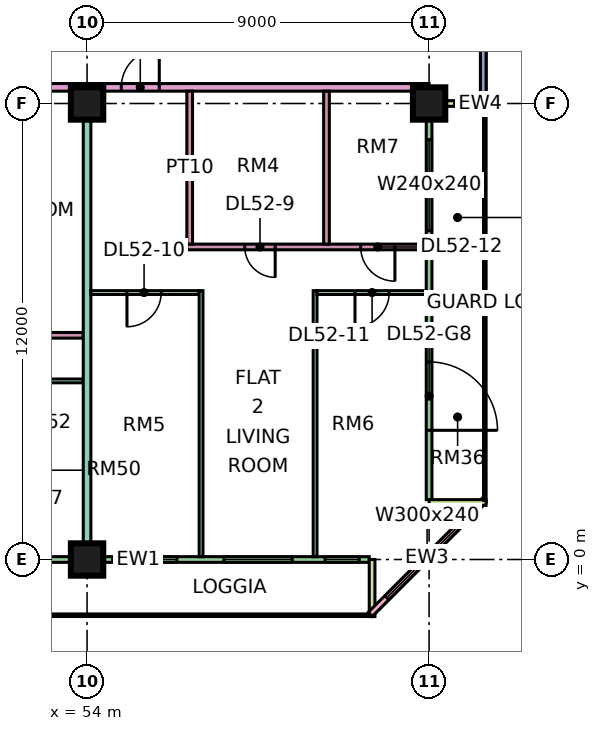
"""IFC4 building model, lengths in metres.
Left out: names, types, materials, properties, quantities, classifications, styles, units other than length and angle.
Written with IfcOpenShell. Run it as: python <this file> out.ifc"""

import sys

from ifc_helpers import new_model, si_unit, direction, frame, frame_2d, origin, origin_2d, place, context, subcontext, project, spatial, rectangle, extrude, element, fill, save


model = new_model("IFC4")
c1 = context("Model", 3, precision=1e-05, world=origin(), true_north=direction((0.0, 1.0)))
c2 = subcontext(c1, "Body", "Model", "MODEL_VIEW")
j1 = project(units=[si_unit("LENGTHUNIT", "METRE"), si_unit("PLANEANGLEUNIT", "RADIAN")], contexts=[c1])
p1 = place(None, origin())
s1 = spatial("IfcSite", under=j1, at=p1, CompositionType="ELEMENT")
p2 = place(p1, origin())
s2 = spatial("IfcBuilding", under=s1, at=p2, CompositionType="ELEMENT")
p3 = place(p2, frame((0.0, 0.0, 222.9)))
s3 = spatial("IfcBuildingStorey", under=s2, at=p3, CompositionType="ELEMENT", Elevation=222.9)
for number, where, z_axis, x_axis in (
    (1, (54.0, 0.0, 0.0), (0.0, 0.0, 1.0), (1.0, 0.0, 0.0)),
    (2, (54.0, 12.0, 0.0), (0.0, 0.0, 1.0), (1.0, 0.0, 0.0)),
    (3, (63.0, 12.0, 0.0), (0.0, 0.0, 1.0), (1.0, 0.0, 0.0)),
):
    element("IfcColumn", number, at=place(p3, frame(where, z_axis=z_axis, x_axis=x_axis)), inside=s3, PredefinedType="COLUMN", context=c2, shape_type="SweptSolid", body=[
        extrude(rectangle(XDim=0.85, YDim=0.85, at=origin_2d()), origin(), (0.0, 0.0, 1.0), 3.75),
    ])
p4 = place(p3, frame((48.075, 0.0, 0.0), z_axis=(0.0, 0.0, 1.0), x_axis=(1.0, 0.0, 0.0)))
e4 = element("IfcWall", 4, at=p4, inside=s3, PredefinedType="SOLIDWALL", context=c2, shape_type="SweptSolid", body=[
    extrude(rectangle(XDim=13.35, YDim=0.15, at=frame_2d((6.675, 0.0))), origin(), (0.0, 0.0, 1.0), 3.35),
])
p5 = place(p4, frame((0.562, 0.0, 0.45)))
e5 = element("IfcOpeningElement", 5, at=p5, cuts=e4, PredefinedType="OPENING", context=c2, shape_type="SweptSolid", body=[
    extrude(rectangle(XDim=1.8, YDim=2.4, at=frame_2d((0.9, 1.2))), frame((0.0, 0.085, 0.0), z_axis=(0.0, -1.0, 0.0), x_axis=(1.0, 0.0, 0.0)), (0.0, 0.0, 1.0), 0.17),
])
p6 = place(p4, frame((3.562, 0.0, 0.0)))
e6 = element("IfcOpeningElement", 6, at=p6, cuts=e4, PredefinedType="OPENING", context=c2, shape_type="SweptSolid", body=[
    extrude(rectangle(XDim=1.2, YDim=2.4, at=frame_2d((0.6, 1.2))), frame((0.0, 0.085, 0.0), z_axis=(0.0, -1.0, 0.0), x_axis=(1.0, 0.0, 0.0)), (0.0, 0.0, 1.0), 0.17),
])
p7 = place(p4, frame((7.087, 0.0, 0.45)))
e7 = element("IfcOpeningElement", 7, at=p7, cuts=e4, PredefinedType="OPENING", context=c2, shape_type="SweptSolid", body=[
    extrude(rectangle(XDim=1.2, YDim=2.4, at=frame_2d((0.6, 1.2))), frame((0.0, 0.085, 0.0), z_axis=(0.0, -1.0, 0.0), x_axis=(1.0, 0.0, 0.0)), (0.0, 0.0, 1.0), 0.17),
])
p8 = place(p4, frame((9.525, 0.0, 0.45)))
e8 = element("IfcOpeningElement", 8, at=p8, cuts=e4, PredefinedType="OPENING", context=c2, shape_type="SweptSolid", body=[
    extrude(rectangle(XDim=1.8, YDim=2.4, at=frame_2d((0.9, 1.2))), frame((0.0, 0.085, 0.0), z_axis=(0.0, -1.0, 0.0), x_axis=(1.0, 0.0, 0.0)), (0.0, 0.0, 1.0), 0.17),
])
p9 = place(p4, frame((12.188, 0.0, 0.45)))
e9 = element("IfcOpeningElement", 9, at=p9, cuts=e4, PredefinedType="OPENING", context=c2, shape_type="SweptSolid", body=[
    extrude(rectangle(XDim=0.9, YDim=2.4, at=frame_2d((0.45, 1.2))), frame((0.0, 0.085, 0.0), z_axis=(0.0, -1.0, 0.0), x_axis=(1.0, 0.0, 0.0)), (0.0, 0.0, 1.0), 0.17),
])
p10 = place(p3, frame((61.5, -1.5, 0.0), z_axis=(0.0, 0.0, 1.0), x_axis=(0.0, 1.0, 0.0)))
e10 = element("IfcWall", 10, at=p10, inside=s3, PredefinedType="SOLIDWALL", context=c2, shape_type="SweptSolid", body=[
    extrude(rectangle(XDim=1.5, YDim=0.15, at=frame_2d((0.75, 0.0))), origin(), (0.0, 0.0, 1.0), 3.35),
])
p11 = place(p3, frame((61.447, -1.447, 0.0), z_axis=(0.0, 0.0, 1.0), x_axis=(0.707106781187, 0.707106781187, 0.0)))
e11 = element("IfcWall", 11, at=p11, inside=s3, PredefinedType="SOLIDWALL", context=c2, shape_type="SweptSolid", body=[
    extrude(rectangle(XDim=4.243, YDim=0.15, at=frame_2d((2.121, 0.0))), origin(), (0.0, 0.0, 1.0), 3.35),
])
p12 = place(p11, frame((0.621, 0.0, 0.45)))
e12 = element("IfcOpeningElement", 12, at=p12, cuts=e11, PredefinedType="OPENING", context=c2, shape_type="SweptSolid", body=[
    extrude(rectangle(XDim=3.0, YDim=2.4, at=frame_2d((1.5, 1.2))), frame((0.0, 0.085, 0.0), z_axis=(0.0, -1.0, 0.0), x_axis=(1.0, 0.0, 0.0)), (0.0, 0.0, 1.0), 0.17),
])
p13 = place(p3, frame((63.0, 1.575, 0.0), z_axis=(0.0, 0.0, 1.0), x_axis=(0.0, 1.0, 0.0)))
e13 = element("IfcWall", 13, at=p13, inside=s3, PredefinedType="SOLIDWALL", context=c2, shape_type="SweptSolid", body=[
    extrude(rectangle(XDim=10.35, YDim=0.15, at=frame_2d((5.175, 0.0))), origin(), (0.0, 0.0, 1.0), 3.35),
])
p14 = place(p13, frame((1.825, 0.0, 0.0)))
e14 = element("IfcOpeningElement", 14, at=p14, cuts=e13, PredefinedType="OPENING", context=c2, shape_type="SweptSolid", body=[
    extrude(rectangle(XDim=1.8, YDim=2.4, at=frame_2d((0.9, 1.2))), frame((0.0, 0.085, 0.0), z_axis=(0.0, -1.0, 0.0), x_axis=(1.0, 0.0, 0.0)), (0.0, 0.0, 1.0), 0.17),
])
p15 = place(p13, frame((7.075, 0.0, 0.45)))
e15 = element("IfcOpeningElement", 15, at=p15, cuts=e13, PredefinedType="OPENING", context=c2, shape_type="SweptSolid", body=[
    extrude(rectangle(XDim=2.4, YDim=2.4, at=frame_2d((1.2, 1.2))), frame((0.0, 0.085, 0.0), z_axis=(0.0, -1.0, 0.0), x_axis=(1.0, 0.0, 0.0)), (0.0, 0.0, 1.0), 0.17),
])
for number, where, z_axis, x_axis in (
    (16, (64.5, 1.5, 0.0), (0.0, 0.0, 1.0), (-1.0, 0.0, 0.0)),
    (17, (64.5, 12.0, 0.0), (0.0, 0.0, 1.0), (-1.0, 0.0, 0.0)),
):
    element("IfcWall", number, at=place(p3, frame(where, z_axis=z_axis, x_axis=x_axis)), inside=s3, PredefinedType="SOLIDWALL", context=c2, shape_type="SweptSolid", body=[
        extrude(rectangle(XDim=1.5, YDim=0.15, at=frame_2d((0.75, 0.0))), origin(), (0.0, 0.0, 1.0), 3.35),
    ])
p16 = place(p3, frame((64.425, 12.075, 0.0), z_axis=(0.0, 0.0, 1.0), x_axis=(0.0, 1.0, 0.0)))
e18 = element("IfcWall", 18, at=p16, inside=s3, PredefinedType="SOLIDWALL", context=c2, shape_type="SweptSolid", body=[
    extrude(rectangle(XDim=10.425, YDim=0.15, at=frame_2d((5.212, 0.0))), origin(), (0.0, 0.0, 1.0), 3.35),
])
p17 = place(p16, frame((4.275, 0.0, 0.45)))
e19 = element("IfcOpeningElement", 19, at=p17, cuts=e18, PredefinedType="OPENING", context=c2, shape_type="SweptSolid", body=[
    extrude(rectangle(XDim=3.0, YDim=2.4, at=frame_2d((1.5, 1.2))), frame((0.0, 0.085, 0.0), z_axis=(0.0, -1.0, 0.0), x_axis=(1.0, 0.0, 0.0)), (0.0, 0.0, 1.0), 0.17),
])
p18 = place(p16, frame((8.625, 0.0, 0.45)))
e20 = element("IfcOpeningElement", 20, at=p18, cuts=e18, PredefinedType="OPENING", context=c2, shape_type="SweptSolid", body=[
    extrude(rectangle(XDim=1.2, YDim=2.4, at=frame_2d((0.6, 1.2))), frame((0.0, 0.085, 0.0), z_axis=(0.0, -1.0, 0.0), x_axis=(1.0, 0.0, 0.0)), (0.0, 0.0, 1.0), 0.17),
])
p19 = place(p3, frame((33.05, 4.7, 0.0), z_axis=(0.0, 0.0, 1.0), x_axis=(1.0, 0.0, 0.0)))
e21 = element("IfcWall", 21, at=p19, inside=s3, PredefinedType="PARTITIONING", context=c2, shape_type="SweptSolid", body=[
    extrude(rectangle(XDim=20.85, YDim=0.1, at=frame_2d((10.425, 0.0))), origin(), (0.0, 0.0, 1.0), 3.35),
])
p20 = place(p19, frame((10.0, 0.0, 0.0)))
e22 = element("IfcOpeningElement", 22, at=p20, cuts=e21, PredefinedType="OPENING", context=c2, shape_type="SweptSolid", body=[
    extrude(rectangle(XDim=0.9, YDim=2.1, at=frame_2d((0.45, 1.05))), frame((0.0, 0.06, 0.0), z_axis=(0.0, -1.0, 0.0), x_axis=(1.0, 0.0, 0.0)), (0.0, 0.0, 1.0), 0.12),
])
p21 = place(p19, frame((13.0, 0.0, 0.0)))
e23 = element("IfcOpeningElement", 23, at=p21, cuts=e21, PredefinedType="OPENING", context=c2, shape_type="SweptSolid", body=[
    extrude(rectangle(XDim=0.9, YDim=2.1, at=frame_2d((0.45, 1.05))), frame((0.0, 0.06, 0.0), z_axis=(0.0, -1.0, 0.0), x_axis=(1.0, 0.0, 0.0)), (0.0, 0.0, 1.0), 0.12),
])
p22 = place(p19, frame((16.0, 0.0, 0.0)))
e24 = element("IfcOpeningElement", 24, at=p22, cuts=e21, PredefinedType="OPENING", context=c2, shape_type="SweptSolid", body=[
    extrude(rectangle(XDim=0.9, YDim=2.1, at=frame_2d((0.45, 1.05))), frame((0.0, 0.06, 0.0), z_axis=(0.0, -1.0, 0.0), x_axis=(1.0, 0.0, 0.0)), (0.0, 0.0, 1.0), 0.12),
])
p23 = place(p19, frame((19.0, 0.0, 0.0)))
e25 = element("IfcOpeningElement", 25, at=p23, cuts=e21, PredefinedType="OPENING", context=c2, shape_type="SweptSolid", body=[
    extrude(rectangle(XDim=0.9, YDim=2.1, at=frame_2d((0.45, 1.05))), frame((0.0, 0.06, 0.0), z_axis=(0.0, -1.0, 0.0), x_axis=(1.0, 0.0, 0.0)), (0.0, 0.0, 1.0), 0.12),
])
p24 = place(p19, frame((4.0, 0.0, 0.0)))
e26 = element("IfcOpeningElement", 26, at=p24, cuts=e21, PredefinedType="OPENING", context=c2, shape_type="SweptSolid", body=[
    extrude(rectangle(XDim=0.9, YDim=2.1, at=frame_2d((0.45, 1.05))), frame((0.0, 0.06, 0.0), z_axis=(0.0, -1.0, 0.0), x_axis=(1.0, 0.0, 0.0)), (0.0, 0.0, 1.0), 0.12),
])
p25 = place(p3, frame((40.65, 12.425, 0.0), z_axis=(0.0, 0.0, 1.0), x_axis=(1.0, 0.0, 0.0)))
e27 = element("IfcWall", 27, at=p25, inside=s3, PredefinedType="PARTITIONING", context=c2, shape_type="SweptSolid", body=[
    extrude(rectangle(XDim=22.35, YDim=0.2, at=frame_2d((11.175, 0.0))), origin(), (0.0, 0.0, 1.0), 3.35),
])
p26 = place(p25, frame((14.25, 0.0, 0.0)))
e28 = element("IfcOpeningElement", 28, at=p26, cuts=e27, PredefinedType="OPENING", context=c2, shape_type="SweptSolid", body=[
    extrude(rectangle(XDim=1.0, YDim=2.1, at=frame_2d((0.5, 1.05))), frame((0.0, 0.11, 0.0), z_axis=(0.0, -1.0, 0.0), x_axis=(1.0, 0.0, 0.0)), (0.0, 0.0, 1.0), 0.22),
])
p27 = place(p25, frame((1.05, 0.0, 0.0)))
e29 = element("IfcOpeningElement", 29, at=p27, cuts=e27, PredefinedType="OPENING", context=c2, shape_type="SweptSolid", body=[
    extrude(rectangle(XDim=1.0, YDim=2.1, at=frame_2d((0.5, 1.05))), frame((0.0, 0.11, 0.0), z_axis=(0.0, -1.0, 0.0), x_axis=(1.0, 0.0, 0.0)), (0.0, 0.0, 1.0), 0.22),
])
p28 = place(p3, frame((43.575, 5.9, 0.0), z_axis=(0.0, 0.0, 1.0), x_axis=(1.0, 0.0, 0.0)))
e30 = element("IfcWall", 30, at=p28, inside=s3, PredefinedType="PARTITIONING", context=c2, shape_type="SweptSolid", body=[
    extrude(rectangle(XDim=10.325, YDim=0.15, at=frame_2d((5.163, 0.0))), origin(), (0.0, 0.0, 1.0), 3.35),
])
p29 = place(p28, frame((1.825, 0.0, 0.0)))
e31 = element("IfcOpeningElement", 31, at=p29, cuts=e30, PredefinedType="OPENING", context=c2, shape_type="SweptSolid", body=[
    extrude(rectangle(XDim=0.8, YDim=2.1, at=frame_2d((0.4, 1.05))), frame((0.0, 0.085, 0.0), z_axis=(0.0, -1.0, 0.0), x_axis=(1.0, 0.0, 0.0)), (0.0, 0.0, 1.0), 0.17),
])
p30 = place(p28, frame((6.975, 0.0, 0.0)))
e32 = element("IfcOpeningElement", 32, at=p30, cuts=e30, PredefinedType="OPENING", context=c2, shape_type="SweptSolid", body=[
    extrude(rectangle(XDim=0.9, YDim=2.1, at=frame_2d((0.45, 1.05))), frame((0.0, 0.085, 0.0), z_axis=(0.0, -1.0, 0.0), x_axis=(1.0, 0.0, 0.0)), (0.0, 0.0, 1.0), 0.17),
])
p31 = place(p3, frame((54.0, 0.074, 0.0), z_axis=(0.0, 0.0, 1.0), x_axis=(0.0, 1.0, 0.0)))
e33 = element("IfcWall", 33, at=p31, inside=s3, PredefinedType="PARTITIONING", context=c2, shape_type="SweptSolid", body=[
    extrude(rectangle(XDim=12.251, YDim=0.2, at=frame_2d((6.125, 0.0))), origin(), (0.0, 0.0, 1.0), 3.35),
])
p32 = place(p3, frame((54.1, 7.025, 0.0), z_axis=(0.0, 0.0, 1.0), x_axis=(1.0, 0.0, 0.0)))
e34 = element("IfcWall", 34, at=p32, inside=s3, PredefinedType="PARTITIONING", context=c2, shape_type="SweptSolid", body=[
    extrude(rectangle(XDim=2.85, YDim=0.1, at=frame_2d((1.425, 0.0))), origin(), (0.0, 0.0, 1.0), 3.35),
])
p33 = place(p32, frame((0.95, 0.0, 0.0)))
e35 = element("IfcOpeningElement", 35, at=p33, cuts=e34, PredefinedType="OPENING", context=c2, shape_type="SweptSolid", body=[
    extrude(rectangle(XDim=0.9, YDim=2.1, at=frame_2d((0.45, 1.05))), frame((0.0, 0.06, 0.0), z_axis=(0.0, -1.0, 0.0), x_axis=(1.0, 0.0, 0.0)), (0.0, 0.0, 1.0), 0.12),
])
p34 = place(p3, frame((56.625, 8.225, 0.0), z_axis=(0.0, 0.0, 1.0), x_axis=(1.0, 0.0, 0.0)))
e36 = element("IfcWall", 36, at=p34, inside=s3, PredefinedType="PARTITIONING", context=c2, shape_type="SweptSolid", body=[
    extrude(rectangle(XDim=6.301, YDim=0.15, at=frame_2d((3.15, 0.0))), origin(), (0.0, 0.0, 1.0), 3.35),
])
p35 = place(p34, frame((1.525, 0.0, 0.0)))
e37 = element("IfcOpeningElement", 37, at=p35, cuts=e36, PredefinedType="OPENING", context=c2, shape_type="SweptSolid", body=[
    extrude(rectangle(XDim=0.8, YDim=2.1, at=frame_2d((0.4, 1.05))), frame((0.0, 0.085, 0.0), z_axis=(0.0, -1.0, 0.0), x_axis=(1.0, 0.0, 0.0)), (0.0, 0.0, 1.0), 0.17),
])
p36 = place(p34, frame((4.575, 0.0, 0.0)))
e38 = element("IfcOpeningElement", 38, at=p36, cuts=e36, PredefinedType="OPENING", context=c2, shape_type="SweptSolid", body=[
    extrude(rectangle(XDim=0.9, YDim=2.1, at=frame_2d((0.45, 1.05))), frame((0.0, 0.085, 0.0), z_axis=(0.0, -1.0, 0.0), x_axis=(1.0, 0.0, 0.0)), (0.0, 0.0, 1.0), 0.17),
])
p37 = place(p3, frame((56.7, 8.3, 0.0), z_axis=(0.0, 0.0, 1.0), x_axis=(0.0, 1.0, 0.0)))
e39 = element("IfcWall", 39, at=p37, inside=s3, PredefinedType="PARTITIONING", context=c2, shape_type="SweptSolid", body=[
    extrude(rectangle(XDim=4.025, YDim=0.15, at=frame_2d((2.012, 0.0))), origin(), (0.0, 0.0, 1.0), 3.35),
])
for number, where, z_axis, x_axis in (
    (40, (57.0, 0.074, 0.0), (0.0, 0.0, 1.0), (0.0, 1.0, 0.0)),
    (41, (60.0, 0.074, 0.0), (0.0, 0.0, 1.0), (0.0, 1.0, 0.0)),
):
    element("IfcWall", number, at=place(p3, frame(where, z_axis=z_axis, x_axis=x_axis)), inside=s3, PredefinedType="PARTITIONING", context=c2, shape_type="SweptSolid", body=[
        extrude(rectangle(XDim=7.001, YDim=0.1, at=frame_2d((3.5, 0.0))), origin(), (0.0, 0.0, 1.0), 3.35),
    ])
p38 = place(p3, frame((60.05, 7.025, 0.0), z_axis=(0.0, 0.0, 1.0), x_axis=(1.0, 0.0, 0.0)))
e42 = element("IfcWall", 42, at=p38, inside=s3, PredefinedType="PARTITIONING", context=c2, shape_type="SweptSolid", body=[
    extrude(rectangle(XDim=2.876, YDim=0.1, at=frame_2d((1.438, 0.0))), origin(), (0.0, 0.0, 1.0), 3.35),
])
p39 = place(p38, frame((1.0, 0.0, 0.0)))
e43 = element("IfcOpeningElement", 43, at=p39, cuts=e42, PredefinedType="OPENING", context=c2, shape_type="SweptSolid", body=[
    extrude(rectangle(XDim=0.9, YDim=2.1, at=frame_2d((0.45, 1.05))), frame((0.0, 0.06, 0.0), z_axis=(0.0, -1.0, 0.0), x_axis=(1.0, 0.0, 0.0)), (0.0, 0.0, 1.0), 0.12),
])
p40 = place(p3, frame((60.3, 8.3, 0.0), z_axis=(0.0, 0.0, 1.0), x_axis=(0.0, 1.0, 0.0)))
e44 = element("IfcWall", 44, at=p40, inside=s3, PredefinedType="PARTITIONING", context=c2, shape_type="SweptSolid", body=[
    extrude(rectangle(XDim=4.025, YDim=0.15, at=frame_2d((2.012, 0.0))), origin(), (0.0, 0.0, 1.0), 3.35),
])
p41 = place(p7, origin())
e45 = element("IfcWindow", 45, at=p41, inside=s3, PartitioningType="SINGLE_PANEL", PredefinedType="WINDOW", context=c2, shape_type="SweptSolid", body=[
    extrude(rectangle(XDim=1.2, YDim=2.4, at=frame_2d((0.6, 1.2))), frame((0.0, 0.03, 0.0), z_axis=(0.0, -1.0, 0.0), x_axis=(1.0, 0.0, 0.0)), (0.0, 0.0, 1.0), 0.06),
])
fill(e7, e45)
p42 = place(p8, origin())
e46 = element("IfcWindow", 46, at=p42, inside=s3, PartitioningType="SINGLE_PANEL", PredefinedType="WINDOW", context=c2, shape_type="SweptSolid", body=[
    extrude(rectangle(XDim=1.8, YDim=2.4, at=frame_2d((0.9, 1.2))), frame((0.0, 0.03, 0.0), z_axis=(0.0, -1.0, 0.0), x_axis=(1.0, 0.0, 0.0)), (0.0, 0.0, 1.0), 0.06),
])
fill(e8, e46)
p43 = place(p9, origin())
e47 = element("IfcWindow", 47, at=p43, inside=s3, PartitioningType="SINGLE_PANEL", PredefinedType="WINDOW", context=c2, shape_type="SweptSolid", body=[
    extrude(rectangle(XDim=0.9, YDim=2.4, at=frame_2d((0.45, 1.2))), frame((0.0, 0.03, 0.0), z_axis=(0.0, -1.0, 0.0), x_axis=(1.0, 0.0, 0.0)), (0.0, 0.0, 1.0), 0.06),
])
fill(e9, e47)
p44 = place(p12, origin())
e48 = element("IfcWindow", 48, at=p44, inside=s3, PartitioningType="SINGLE_PANEL", PredefinedType="WINDOW", context=c2, shape_type="SweptSolid", body=[
    extrude(rectangle(XDim=3.0, YDim=2.4, at=frame_2d((1.5, 1.2))), frame((0.0, 0.03, 0.0), z_axis=(0.0, -1.0, 0.0), x_axis=(1.0, 0.0, 0.0)), (0.0, 0.0, 1.0), 0.06),
])
fill(e12, e48)
p45 = place(p14, frame((1.8, 0.0, 0.0), z_axis=(0.0, 0.0, 1.0), x_axis=(-1.0, 0.0, 0.0)))
e49 = element("IfcDoor", 49, at=p45, inside=s3, OperationType="DOUBLE_DOOR_SINGLE_SWING", PredefinedType="DOOR", context=c2, shape_type="SweptSolid", body=[
    extrude(rectangle(XDim=1.8, YDim=2.4, at=frame_2d((0.9, 1.2))), frame((0.0, 0.025, 0.0), z_axis=(0.0, -1.0, 0.0), x_axis=(1.0, 0.0, 0.0)), (0.0, 0.0, 1.0), 0.05),
])
fill(e14, e49)
p46 = place(p15, origin())
e50 = element("IfcWindow", 50, at=p46, inside=s3, PartitioningType="SINGLE_PANEL", PredefinedType="WINDOW", context=c2, shape_type="SweptSolid", body=[
    extrude(rectangle(XDim=2.4, YDim=2.4, at=frame_2d((1.2, 1.2))), frame((0.0, 0.03, 0.0), z_axis=(0.0, -1.0, 0.0), x_axis=(1.0, 0.0, 0.0)), (0.0, 0.0, 1.0), 0.06),
])
fill(e15, e50)
p47 = place(p35, origin())
e51 = element("IfcDoor", 51, at=p47, inside=s3, OperationType="SINGLE_SWING_RIGHT", PredefinedType="DOOR", context=c2, shape_type="SweptSolid", body=[
    extrude(rectangle(XDim=0.8, YDim=2.1, at=frame_2d((0.4, 1.05))), frame((0.0, 0.025, 0.0), z_axis=(0.0, -1.0, 0.0), x_axis=(1.0, 0.0, 0.0)), (0.0, 0.0, 1.0), 0.05),
])
fill(e37, e51)
p48 = place(p33, frame((0.9, 0.0, 0.0), z_axis=(0.0, 0.0, 1.0), x_axis=(-1.0, 0.0, 0.0)))
e52 = element("IfcDoor", 52, at=p48, inside=s3, OperationType="SINGLE_SWING_LEFT", PredefinedType="DOOR", context=c2, shape_type="SweptSolid", body=[
    extrude(rectangle(XDim=0.9, YDim=2.1, at=frame_2d((0.45, 1.05))), frame((0.0, 0.025, 0.0), z_axis=(0.0, -1.0, 0.0), x_axis=(1.0, 0.0, 0.0)), (0.0, 0.0, 1.0), 0.05),
])
fill(e35, e52)
p49 = place(p39, frame((0.9, 0.0, 0.0), z_axis=(0.0, 0.0, 1.0), x_axis=(-1.0, 0.0, 0.0)))
e53 = element("IfcDoor", 53, at=p49, inside=s3, OperationType="SINGLE_SWING_LEFT", PredefinedType="DOOR", context=c2, shape_type="SweptSolid", body=[
    extrude(rectangle(XDim=0.9, YDim=2.1, at=frame_2d((0.45, 1.05))), frame((0.0, 0.025, 0.0), z_axis=(0.0, -1.0, 0.0), x_axis=(1.0, 0.0, 0.0)), (0.0, 0.0, 1.0), 0.05),
])
fill(e43, e53)
p50 = place(p36, origin())
e54 = element("IfcDoor", 54, at=p50, inside=s3, OperationType="SINGLE_SWING_RIGHT", PredefinedType="DOOR", context=c2, shape_type="SweptSolid", body=[
    extrude(rectangle(XDim=0.9, YDim=2.1, at=frame_2d((0.45, 1.05))), frame((0.0, 0.025, 0.0), z_axis=(0.0, -1.0, 0.0), x_axis=(1.0, 0.0, 0.0)), (0.0, 0.0, 1.0), 0.05),
])
fill(e38, e54)
p51 = place(p26, frame((1.0, 0.0, 0.0), z_axis=(0.0, 0.0, 1.0), x_axis=(-1.0, 0.0, 0.0)))
e55 = element("IfcDoor", 55, at=p51, inside=s3, OperationType="SINGLE_SWING_RIGHT", PredefinedType="DOOR", context=c2, shape_type="SweptSolid", body=[
    extrude(rectangle(XDim=1.0, YDim=2.1, at=frame_2d((0.5, 1.05))), frame((0.0, 0.025, 0.0), z_axis=(0.0, -1.0, 0.0), x_axis=(1.0, 0.0, 0.0)), (0.0, 0.0, 1.0), 0.05),
])
fill(e28, e55)
save(model, sys.argv[1])
